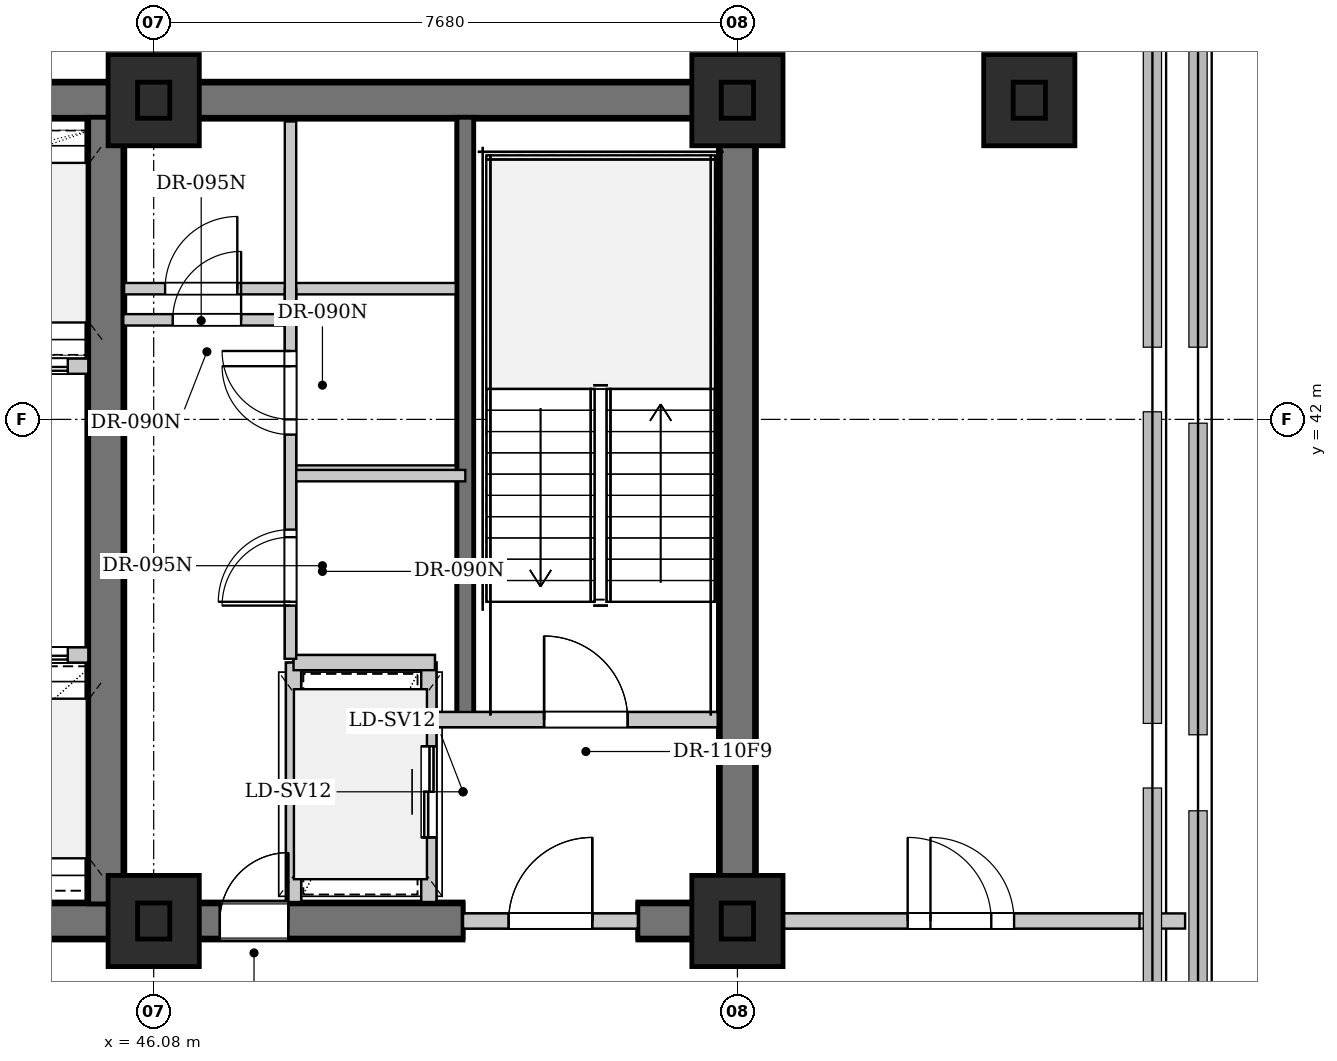
"""IFC4 building model, lengths in metres.
Left out: names, types, materials, properties, quantities, classifications, styles, units other than length and angle.
Written with IfcOpenShell. Run it as: python <this file> out.ifc"""

import sys

from ifc_helpers import new_model, si_unit, direction, frame, frame_2d, origin, origin_2d, place, context, subcontext, project, spatial, rectangle, extrude, element, fill, save


model = new_model("IFC4")
c1 = context("Model", 3, precision=1e-05, world=origin(), true_north=direction((0.0, 1.0)))
c2 = subcontext(c1, "Body", "Model", "MODEL_VIEW")
j1 = project(units=[si_unit("LENGTHUNIT", "METRE"), si_unit("PLANEANGLEUNIT", "RADIAN")], contexts=[c1])
p1 = place(None, origin())
s1 = spatial("IfcSite", under=j1, at=p1, CompositionType="ELEMENT")
p2 = place(p1, origin())
s2 = spatial("IfcBuilding", under=s1, at=p2, CompositionType="ELEMENT")
p3 = place(p2, frame((0.0, 0.0, 78.0)))
s3 = spatial("IfcBuildingStorey", under=s2, at=p3, CompositionType="ELEMENT", Elevation=78.0)
p4 = place(p3, frame((22.79, 46.2, 0.0), z_axis=(0.0, 0.0, 1.0), x_axis=(1.0, 0.0, 0.0)))
e1 = element("IfcWall", 1, at=p4, inside=s3, PredefinedType="SHEAR", context=c2, shape_type="SweptSolid", body=[
    extrude(rectangle(XDim=31.22, YDim=0.5, at=frame_2d((15.61, 0.0))), origin(), (0.0, 0.0, 1.0), 3.68),
])
p5 = place(p3, frame((42.1, 35.4, 0.0), z_axis=(0.0, 0.0, 1.0), x_axis=(1.0, 0.0, 0.0)))
e2 = element("IfcWall", 2, at=p5, inside=s3, PredefinedType="SHEAR", context=c2, shape_type="SweptSolid", body=[
    extrude(rectangle(XDim=8.05, YDim=0.5, at=frame_2d((4.025, 0.0))), origin(), (0.0, 0.0, 1.0), 3.68),
])
p6 = place(p5, frame((4.85, 0.0, 0.0)))
e3 = element("IfcOpeningElement", 3, at=p6, cuts=e2, PredefinedType="OPENING", context=c2, shape_type="SweptSolid", body=[
    extrude(rectangle(XDim=0.9, YDim=2.15, at=frame_2d((0.45, 1.075))), frame((0.0, 0.26, 0.0), z_axis=(0.0, -1.0, 0.0), x_axis=(1.0, 0.0, 0.0)), (0.0, 0.0, 1.0), 0.52),
])
p7 = place(p3, frame((52.45, 35.4, 0.0), z_axis=(0.0, 0.0, 1.0), x_axis=(1.0, 0.0, 0.0)))
e4 = element("IfcWall", 4, at=p7, inside=s3, PredefinedType="SHEAR", context=c2, shape_type="SweptSolid", body=[
    extrude(rectangle(XDim=1.56, YDim=0.5, at=frame_2d((0.78, 0.0))), origin(), (0.0, 0.0, 1.0), 3.68),
])
for number, where, z_axis, x_axis in (
    (5, (45.45, 35.65, 0.0), (0.0, 0.0, 1.0), (0.0, 1.0, 0.0)),
    (6, (53.76, 35.65, 0.0), (0.0, 0.0, 1.0), (0.0, 1.0, 0.0)),
):
    element("IfcWall", number, at=place(p3, frame(where, z_axis=z_axis, x_axis=x_axis)), inside=s3, PredefinedType="SHEAR", context=c2, shape_type="SweptSolid", body=[
        extrude(rectangle(XDim=10.3, YDim=0.5, at=frame_2d((5.15, 0.0))), origin(), (0.0, 0.0, 1.0), 3.68),
    ])
p8 = place(p3, frame((50.18, 38.05, 0.0), z_axis=(0.0, 0.0, 1.0), x_axis=(0.0, 1.0, 0.0)))
e7 = element("IfcWall", 7, at=p8, inside=s3, PredefinedType="SHEAR", context=c2, shape_type="SweptSolid", body=[
    extrude(rectangle(XDim=7.9, YDim=0.22, at=frame_2d((3.95, 0.0))), origin(), (0.0, 0.0, 1.0), 3.68),
])
for number, where, z_axis, x_axis in (
    (8, (46.08, 35.4, 0.0), (0.0, 0.0, 1.0), (1.0, 0.0, 0.0)),
    (9, (46.08, 46.2, 0.0), (0.0, 0.0, 1.0), (1.0, 0.0, 0.0)),
    (10, (53.76, 35.4, 0.0), (0.0, 0.0, 1.0), (1.0, 0.0, 0.0)),
    (11, (53.76, 46.2, 0.0), (0.0, 0.0, 1.0), (1.0, 0.0, 0.0)),
    (12, (57.6, 46.2, 0.0), (0.0, 0.0, 1.0), (1.0, 0.0, 0.0)),
):
    element("IfcColumn", number, at=place(p3, frame(where, z_axis=z_axis, x_axis=x_axis)), inside=s3, PredefinedType="COLUMN", context=c2, shape_type="SweptSolid", body=[
        extrude(rectangle(XDim=1.2, YDim=1.2, at=origin_2d()), origin(), (0.0, 0.0, 1.0), 3.9),
    ])
for number, where, z_axis, x_axis in (
    (13, (41.85, 38.9, 0.0), (0.0, 0.0, 1.0), (1.0, 0.0, 0.0)),
    (14, (41.85, 42.7, 0.0), (0.0, 0.0, 1.0), (1.0, 0.0, 0.0)),
):
    element("IfcWall", number, at=place(p3, frame(where, z_axis=z_axis, x_axis=x_axis)), inside=s3, PredefinedType="PARTITIONING", context=c2, shape_type="SweptSolid", body=[
        extrude(rectangle(XDim=3.37, YDim=0.2, at=frame_2d((1.685, 0.0))), origin(), (0.0, 0.0, 1.0), 3.68),
    ])
p9 = place(p3, frame((49.78, 38.05, 0.0), z_axis=(0.0, 0.0, 1.0), x_axis=(1.0, 0.0, 0.0)))
e15 = element("IfcWall", 15, at=p9, inside=s3, PredefinedType="PARTITIONING", context=c2, shape_type="SweptSolid", body=[
    extrude(rectangle(XDim=3.72, YDim=0.2, at=frame_2d((1.86, 0.0))), origin(), (0.0, 0.0, 1.0), 3.68),
])
p10 = place(p9, frame((1.436, 0.0, 0.0)))
e16 = element("IfcOpeningElement", 16, at=p10, cuts=e15, PredefinedType="OPENING", context=c2, shape_type="SweptSolid", body=[
    extrude(rectangle(XDim=1.1, YDim=2.15, at=frame_2d((0.55, 1.075))), frame((0.0, 0.11, 0.0), z_axis=(0.0, -1.0, 0.0), x_axis=(1.0, 0.0, 0.0)), (0.0, 0.0, 1.0), 0.22),
])
p11 = place(p3, frame((50.15, 35.4, 0.0), z_axis=(0.0, 0.0, 1.0), x_axis=(1.0, 0.0, 0.0)))
e17 = element("IfcWall", 17, at=p11, inside=s3, PredefinedType="PARTITIONING", context=c2, shape_type="SweptSolid", body=[
    extrude(rectangle(XDim=2.3, YDim=0.2, at=frame_2d((1.15, 0.0))), origin(), (0.0, 0.0, 1.0), 2.765),
])
p12 = place(p11, frame((0.6, 0.0, 0.0)))
e18 = element("IfcOpeningElement", 18, at=p12, cuts=e17, PredefinedType="OPENING", context=c2, shape_type="SweptSolid", body=[
    extrude(rectangle(XDim=1.1, YDim=2.15, at=frame_2d((0.55, 1.075))), frame((0.0, 0.11, 0.0), z_axis=(0.0, -1.0, 0.0), x_axis=(1.0, 0.0, 0.0)), (0.0, 0.0, 1.0), 0.22),
])
p13 = place(p3, frame((49.7, 35.65, 0.0), z_axis=(0.0, 0.0, 1.0), x_axis=(0.0, 1.0, 0.0)))
e19 = element("IfcWall", 19, at=p13, inside=s3, PredefinedType="PARTITIONING", context=c2, shape_type="SweptSolid", body=[
    extrude(rectangle(XDim=3.15, YDim=0.2, at=frame_2d((1.575, 0.0))), origin(), (0.0, 0.0, 1.0), 3.68),
])
p14 = place(p13, frame((0.85, 0.0, 0.0)))
e20 = element("IfcOpeningElement", 20, at=p14, cuts=e19, PredefinedType="OPENING", context=c2, shape_type="SweptSolid", body=[
    extrude(rectangle(XDim=1.2, YDim=2.2, at=frame_2d((0.6, 1.1))), frame((0.0, 0.11, 0.0), z_axis=(0.0, -1.0, 0.0), x_axis=(1.0, 0.0, 0.0)), (0.0, 0.0, 1.0), 0.22),
])
p15 = place(p3, frame((47.92, 35.65, 0.0), z_axis=(0.0, 0.0, 1.0), x_axis=(0.0, 1.0, 0.0)))
e21 = element("IfcWall", 21, at=p15, inside=s3, PredefinedType="PARTITIONING", context=c2, shape_type="SweptSolid", body=[
    extrude(rectangle(XDim=3.15, YDim=0.2, at=frame_2d((1.575, 0.0))), origin(), (0.0, 0.0, 1.0), 3.68),
])
p16 = place(p3, frame((47.92, 38.8, 0.0), z_axis=(0.0, 0.0, 1.0), x_axis=(1.0, 0.0, 0.0)))
e22 = element("IfcWall", 22, at=p16, inside=s3, PredefinedType="PARTITIONING", context=c2, shape_type="SweptSolid", body=[
    extrude(rectangle(XDim=1.86, YDim=0.2, at=frame_2d((0.93, 0.0))), origin(), (0.0, 0.0, 1.0), 3.68),
])
p17 = place(p3, frame((45.68, 43.72, 0.0), z_axis=(0.0, 0.0, 1.0), x_axis=(1.0, 0.0, 0.0)))
e23 = element("IfcWall", 23, at=p17, inside=s3, PredefinedType="PARTITIONING", context=c2, shape_type="SweptSolid", body=[
    extrude(rectangle(XDim=4.5, YDim=0.15, at=frame_2d((2.25, 0.0))), origin(), (0.0, 0.0, 1.0), 3.68),
])
p18 = place(p17, frame((0.55, 0.0, 0.0)))
e24 = element("IfcOpeningElement", 24, at=p18, cuts=e23, PredefinedType="OPENING", context=c2, shape_type="SweptSolid", body=[
    extrude(rectangle(XDim=0.95, YDim=2.15, at=frame_2d((0.475, 1.075))), frame((0.0, 0.085, 0.0), z_axis=(0.0, -1.0, 0.0), x_axis=(1.0, 0.0, 0.0)), (0.0, 0.0, 1.0), 0.17),
])
p19 = place(p3, frame((47.88, 41.32, 0.0), z_axis=(0.0, 0.0, 1.0), x_axis=(1.0, 0.0, 0.0)))
e25 = element("IfcWall", 25, at=p19, inside=s3, PredefinedType="PARTITIONING", context=c2, shape_type="SweptSolid", body=[
    extrude(rectangle(XDim=2.3, YDim=0.15, at=frame_2d((1.15, 0.0))), origin(), (0.0, 0.0, 1.0), 3.68),
])
p20 = place(p3, frame((47.88, 38.85, 0.0), z_axis=(0.0, 0.0, 1.0), x_axis=(0.0, 1.0, 0.0)))
e26 = element("IfcWall", 26, at=p20, inside=s3, PredefinedType="PARTITIONING", context=c2, shape_type="SweptSolid", body=[
    extrude(rectangle(XDim=4.87, YDim=0.15, at=frame_2d((2.435, 0.0))), origin(), (0.0, 0.0, 1.0), 3.68),
])
p21 = place(p20, frame((0.7, 0.0, 0.0)))
e27 = element("IfcOpeningElement", 27, at=p21, cuts=e26, PredefinedType="OPENING", context=c2, shape_type="SweptSolid", body=[
    extrude(rectangle(XDim=0.9, YDim=2.15, at=frame_2d((0.45, 1.075))), frame((0.0, 0.085, 0.0), z_axis=(0.0, -1.0, 0.0), x_axis=(1.0, 0.0, 0.0)), (0.0, 0.0, 1.0), 0.17),
])
p22 = place(p20, frame((3.15, 0.0, 0.0)))
e28 = element("IfcOpeningElement", 28, at=p22, cuts=e26, PredefinedType="OPENING", context=c2, shape_type="SweptSolid", body=[
    extrude(rectangle(XDim=0.9, YDim=2.15, at=frame_2d((0.45, 1.075))), frame((0.0, 0.085, 0.0), z_axis=(0.0, -1.0, 0.0), x_axis=(1.0, 0.0, 0.0)), (0.0, 0.0, 1.0), 0.17),
])
p23 = place(p3, frame((54.05, 35.4, 0.0), z_axis=(0.0, 0.0, 1.0), x_axis=(1.0, 0.0, 0.0)))
e29 = element("IfcWall", 29, at=p23, inside=s3, PredefinedType="PARTITIONING", context=c2, shape_type="SweptSolid", body=[
    extrude(rectangle(XDim=5.6, YDim=0.2, at=frame_2d((2.8, 0.0))), origin(), (0.0, 0.0, 1.0), 3.68),
])
p24 = place(p23, frame((2.25, 0.0, 0.0)))
e30 = element("IfcOpeningElement", 30, at=p24, cuts=e29, PredefinedType="OPENING", context=c2, shape_type="SweptSolid", body=[
    extrude(rectangle(XDim=1.1, YDim=2.15, at=frame_2d((0.55, 1.075))), frame((0.0, 0.11, 0.0), z_axis=(0.0, -1.0, 0.0), x_axis=(1.0, 0.0, 0.0)), (0.0, 0.0, 1.0), 0.22),
])
p25 = place(p10, origin())
e31 = element("IfcDoor", 31, at=p25, inside=s3, OperationType="SINGLE_SWING_LEFT", PredefinedType="DOOR", context=c2, shape_type="SweptSolid", body=[
    extrude(rectangle(XDim=1.1, YDim=2.15, at=frame_2d((0.55, 1.075))), frame((0.0, 0.025, 0.0), z_axis=(0.0, -1.0, 0.0), x_axis=(1.0, 0.0, 0.0)), (0.0, 0.0, 1.0), 0.05),
])
fill(e16, e31)
p26 = place(p12, origin())
e32 = element("IfcDoor", 32, at=p26, inside=s3, OperationType="SINGLE_SWING_RIGHT", PredefinedType="DOOR", context=c2, shape_type="SweptSolid", body=[
    extrude(rectangle(XDim=1.1, YDim=2.15, at=frame_2d((0.55, 1.075))), frame((0.0, 0.025, 0.0), z_axis=(0.0, -1.0, 0.0), x_axis=(1.0, 0.0, 0.0)), (0.0, 0.0, 1.0), 0.05),
])
fill(e18, e32)
p27 = place(p14, origin())
e33 = element("IfcDoor", 33, at=p27, inside=s3, OperationType="DOUBLE_DOOR_SLIDING", PredefinedType="DOOR", context=c2, shape_type="SweptSolid", body=[
    extrude(rectangle(XDim=1.2, YDim=2.2, at=frame_2d((0.6, 1.1))), frame((0.0, 0.025, 0.0), z_axis=(0.0, -1.0, 0.0), x_axis=(1.0, 0.0, 0.0)), (0.0, 0.0, 1.0), 0.05),
])
fill(e20, e33)
p28 = place(p18, origin())
e34 = element("IfcDoor", 34, at=p28, inside=s3, OperationType="SINGLE_SWING_RIGHT", PredefinedType="DOOR", context=c2, shape_type="SweptSolid", body=[
    extrude(rectangle(XDim=0.95, YDim=2.15, at=frame_2d((0.475, 1.075))), frame((0.0, 0.025, 0.0), z_axis=(0.0, -1.0, 0.0), x_axis=(1.0, 0.0, 0.0)), (0.0, 0.0, 1.0), 0.05),
])
fill(e24, e34)
p29 = place(p21, origin())
e35 = element("IfcDoor", 35, at=p29, inside=s3, OperationType="SINGLE_SWING_LEFT", PredefinedType="DOOR", context=c2, shape_type="SweptSolid", body=[
    extrude(rectangle(XDim=0.9, YDim=2.15, at=frame_2d((0.45, 1.075))), frame((0.0, 0.025, 0.0), z_axis=(0.0, -1.0, 0.0), x_axis=(1.0, 0.0, 0.0)), (0.0, 0.0, 1.0), 0.05),
])
fill(e27, e35)
p30 = place(p22, origin())
e36 = element("IfcDoor", 36, at=p30, inside=s3, OperationType="SINGLE_SWING_RIGHT", PredefinedType="DOOR", context=c2, shape_type="SweptSolid", body=[
    extrude(rectangle(XDim=0.9, YDim=2.15, at=frame_2d((0.45, 1.075))), frame((0.0, 0.025, 0.0), z_axis=(0.0, -1.0, 0.0), x_axis=(1.0, 0.0, 0.0)), (0.0, 0.0, 1.0), 0.05),
])
fill(e28, e36)
p31 = place(p24, origin())
e37 = element("IfcDoor", 37, at=p31, inside=s3, OperationType="SINGLE_SWING_LEFT", PredefinedType="DOOR", context=c2, shape_type="SweptSolid", body=[
    extrude(rectangle(XDim=1.1, YDim=2.15, at=frame_2d((0.55, 1.075))), frame((0.0, 0.025, 0.0), z_axis=(0.0, -1.0, 0.0), x_axis=(1.0, 0.0, 0.0)), (0.0, 0.0, 1.0), 0.05),
])
fill(e30, e37)
p32 = place(p6, origin())
e38 = element("IfcDoor", 38, at=p32, inside=s3, OperationType="SINGLE_SWING_RIGHT", PredefinedType="DOOR", context=c2, shape_type="SweptSolid", body=[
    extrude(rectangle(XDim=0.9, YDim=2.15, at=frame_2d((0.45, 1.075))), frame((0.0, 0.025, 0.0), z_axis=(0.0, -1.0, 0.0), x_axis=(1.0, 0.0, 0.0)), (0.0, 0.0, 1.0), 0.05),
])
fill(e3, e38)
save(model, sys.argv[1])
